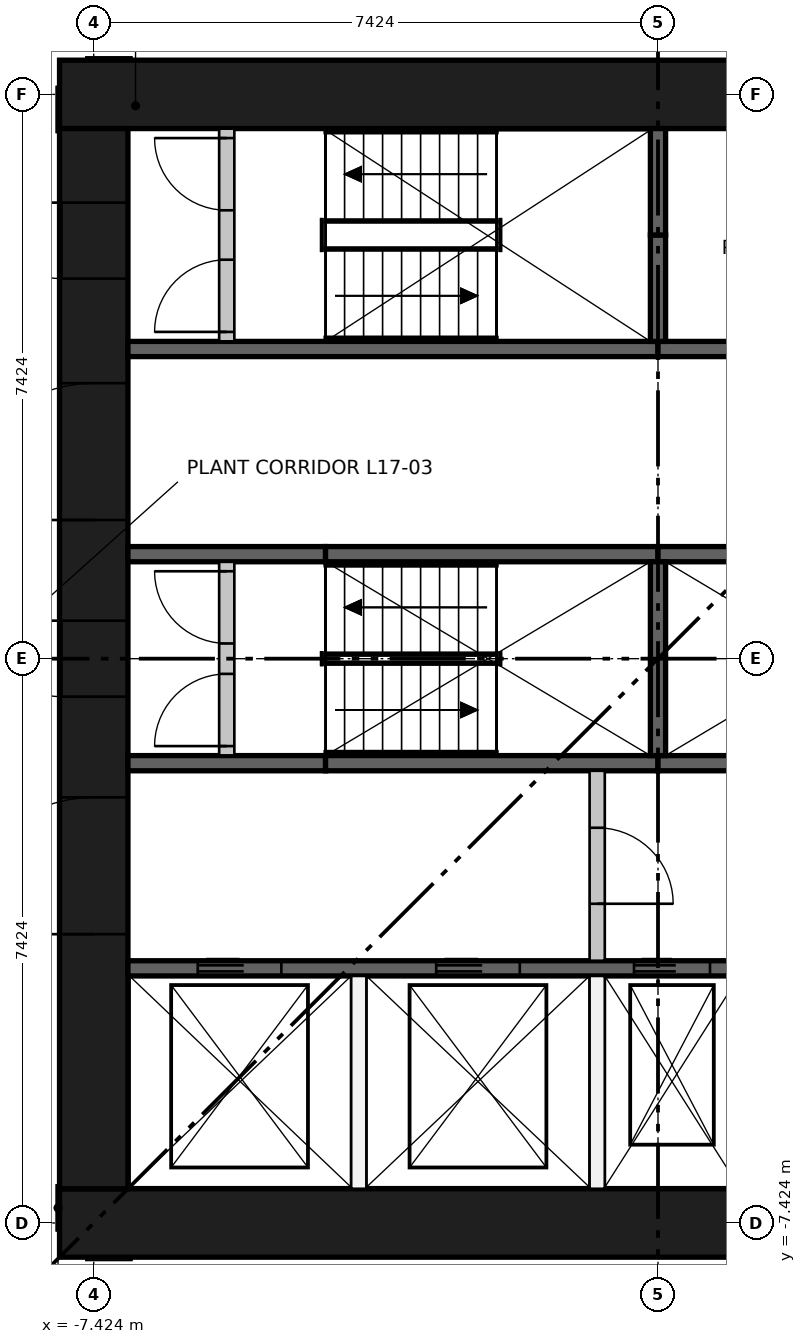
"""IFC4 building model, lengths in metres.
Left out: names, types, materials, properties, quantities, classifications, styles, units other than length and angle.
Written with IfcOpenShell. Run it as: python <this file> out.ifc"""

import sys

from ifc_helpers import new_model, si_unit, direction, frame, frame_2d, origin, place, context, subcontext, project, spatial, rectangle, extrude, element, fill, save


model = new_model("IFC4")
c1 = context("Model", 3, precision=1e-05, world=origin(), true_north=direction((0.0, 1.0)))
c2 = subcontext(c1, "Body", "Model", "MODEL_VIEW")
j1 = project(units=[si_unit("LENGTHUNIT", "METRE"), si_unit("PLANEANGLEUNIT", "RADIAN")], contexts=[c1])
p1 = place(None, origin())
s1 = spatial("IfcSite", under=j1, at=p1, CompositionType="ELEMENT")
p2 = place(p1, origin())
s2 = spatial("IfcBuilding", under=s1, at=p2, CompositionType="ELEMENT")
p3 = place(p2, frame((0.0, 0.0, 66.35)))
s3 = spatial("IfcBuildingStorey", under=s2, at=p3, CompositionType="ELEMENT", Elevation=66.35)
for number, where, z_axis, x_axis in (
    (1, (-7.874, -7.424, 0.0), (0.0, 0.0, 1.0), (1.0, 0.0, 0.0)),
    (2, (-7.874, 7.424, 0.0), (0.0, 0.0, 1.0), (1.0, 0.0, 0.0)),
):
    element("IfcWall", number, at=place(p3, frame(where, z_axis=z_axis, x_axis=x_axis)), inside=s3, PredefinedType="SHEAR", context=c2, shape_type="SweptSolid", body=[
        extrude(rectangle(XDim=15.748, YDim=0.9, at=frame_2d((7.874, 0.0))), origin(), (0.0, 0.0, 1.0), 6.4),
    ])
p4 = place(p3, frame((-7.424, -6.974, 0.0), z_axis=(0.0, 0.0, 1.0), x_axis=(0.0, 1.0, 0.0)))
e3 = element("IfcWall", 3, at=p4, inside=s3, PredefinedType="SHEAR", context=c2, shape_type="SweptSolid", body=[
    extrude(rectangle(XDim=13.948, YDim=0.9, at=frame_2d((6.974, 0.0))), origin(), (0.0, 0.0, 1.0), 6.4),
])
p5 = place(p4, frame((6.474, 0.0, 0.0)))
e4 = element("IfcOpeningElement", 4, at=p5, cuts=e3, PredefinedType="OPENING", context=c2, shape_type="SweptSolid", body=[
    extrude(rectangle(XDim=1.0, YDim=2.1, at=frame_2d((0.5, 1.05))), frame((0.0, 0.46, 0.0), z_axis=(0.0, -1.0, 0.0), x_axis=(1.0, 0.0, 0.0)), (0.0, 0.0, 1.0), 0.92),
])
p6 = place(p4, frame((3.35, 0.0, 0.0)))
e5 = element("IfcOpeningElement", 5, at=p6, cuts=e3, PredefinedType="OPENING", context=c2, shape_type="SweptSolid", body=[
    extrude(rectangle(XDim=1.8, YDim=2.1, at=frame_2d((0.9, 1.05))), frame((0.0, 0.46, 0.0), z_axis=(0.0, -1.0, 0.0), x_axis=(1.0, 0.0, 0.0)), (0.0, 0.0, 1.0), 0.92),
])
p7 = place(p4, frame((8.799, 0.0, 0.0)))
e6 = element("IfcOpeningElement", 6, at=p7, cuts=e3, PredefinedType="OPENING", context=c2, shape_type="SweptSolid", body=[
    extrude(rectangle(XDim=1.8, YDim=2.1, at=frame_2d((0.9, 1.05))), frame((0.0, 0.46, 0.0), z_axis=(0.0, -1.0, 0.0), x_axis=(1.0, 0.0, 0.0)), (0.0, 0.0, 1.0), 0.92),
])
p8 = place(p4, frame((11.974, 0.0, 0.0)))
e7 = element("IfcOpeningElement", 7, at=p8, cuts=e3, PredefinedType="OPENING", context=c2, shape_type="SweptSolid", body=[
    extrude(rectangle(XDim=1.0, YDim=2.1, at=frame_2d((0.5, 1.05))), frame((0.0, 0.46, 0.0), z_axis=(0.0, -1.0, 0.0), x_axis=(1.0, 0.0, 0.0)), (0.0, 0.0, 1.0), 0.92),
])
p9 = place(p3, frame((-6.974, -4.074, 0.0), z_axis=(0.0, 0.0, 1.0), x_axis=(1.0, 0.0, 0.0)))
e8 = element("IfcWall", 8, at=p9, inside=s3, PredefinedType="SHEAR", context=c2, shape_type="SweptSolid", body=[
    extrude(rectangle(XDim=13.948, YDim=0.2, at=frame_2d((6.974, 0.0))), origin(), (0.0, 0.0, 1.0), 6.05),
])
p10 = place(p9, frame((0.918, 0.0, 0.0)))
e9 = element("IfcOpeningElement", 9, at=p10, cuts=e8, PredefinedType="OPENING", context=c2, shape_type="SweptSolid", body=[
    extrude(rectangle(XDim=1.1, YDim=2.1, at=frame_2d((0.55, 1.05))), frame((0.0, 0.11, 0.0), z_axis=(0.0, -1.0, 0.0), x_axis=(1.0, 0.0, 0.0)), (0.0, 0.0, 1.0), 0.22),
])
p11 = place(p9, frame((4.055, 0.0, 0.0)))
e10 = element("IfcOpeningElement", 10, at=p11, cuts=e8, PredefinedType="OPENING", context=c2, shape_type="SweptSolid", body=[
    extrude(rectangle(XDim=1.1, YDim=2.1, at=frame_2d((0.55, 1.05))), frame((0.0, 0.11, 0.0), z_axis=(0.0, -1.0, 0.0), x_axis=(1.0, 0.0, 0.0)), (0.0, 0.0, 1.0), 0.22),
])
p12 = place(p9, frame((6.658, 0.0, 0.0)))
e11 = element("IfcOpeningElement", 11, at=p12, cuts=e8, PredefinedType="OPENING", context=c2, shape_type="SweptSolid", body=[
    extrude(rectangle(XDim=1.0, YDim=2.1, at=frame_2d((0.5, 1.05))), frame((0.0, 0.11, 0.0), z_axis=(0.0, -1.0, 0.0), x_axis=(1.0, 0.0, 0.0)), (0.0, 0.0, 1.0), 0.22),
])
p13 = place(p9, frame((8.627, 0.0, 0.0)))
e12 = element("IfcOpeningElement", 12, at=p13, cuts=e8, PredefinedType="OPENING", context=c2, shape_type="SweptSolid", body=[
    extrude(rectangle(XDim=1.0, YDim=2.1, at=frame_2d((0.5, 1.05))), frame((0.0, 0.11, 0.0), z_axis=(0.0, -1.0, 0.0), x_axis=(1.0, 0.0, 0.0)), (0.0, 0.0, 1.0), 0.22),
])
p14 = place(p9, frame((10.595, 0.0, 0.0)))
e13 = element("IfcOpeningElement", 13, at=p14, cuts=e8, PredefinedType="OPENING", context=c2, shape_type="SweptSolid", body=[
    extrude(rectangle(XDim=1.0, YDim=2.1, at=frame_2d((0.5, 1.05))), frame((0.0, 0.11, 0.0), z_axis=(0.0, -1.0, 0.0), x_axis=(1.0, 0.0, 0.0)), (0.0, 0.0, 1.0), 0.22),
])
p15 = place(p9, frame((12.564, 0.0, 0.0)))
e14 = element("IfcOpeningElement", 14, at=p15, cuts=e8, PredefinedType="OPENING", context=c2, shape_type="SweptSolid", body=[
    extrude(rectangle(XDim=1.0, YDim=2.1, at=frame_2d((0.5, 1.05))), frame((0.0, 0.11, 0.0), z_axis=(0.0, -1.0, 0.0), x_axis=(1.0, 0.0, 0.0)), (0.0, 0.0, 1.0), 0.22),
])
p16 = place(p3, frame((-6.974, 4.074, 0.0), z_axis=(0.0, 0.0, 1.0), x_axis=(1.0, 0.0, 0.0)))
e15 = element("IfcWall", 15, at=p16, inside=s3, PredefinedType="SHEAR", context=c2, shape_type="SweptSolid", body=[
    extrude(rectangle(XDim=6.974, YDim=0.2, at=frame_2d((3.487, 0.0))), origin(), (0.0, 0.0, 1.0), 6.05),
])
p17 = place(p3, frame((0.0, 4.074, 0.0), z_axis=(0.0, 0.0, 1.0), x_axis=(1.0, 0.0, 0.0)))
e16 = element("IfcWall", 16, at=p17, inside=s3, PredefinedType="SHEAR", context=c2, shape_type="SweptSolid", body=[
    extrude(rectangle(XDim=6.974, YDim=0.2, at=frame_2d((3.487, 0.0))), origin(), (0.0, 0.0, 1.0), 6.05),
])
p18 = place(p17, frame((1.187, 0.0, 0.0)))
e17 = element("IfcOpeningElement", 17, at=p18, cuts=e16, PredefinedType="OPENING", context=c2, shape_type="SweptSolid", body=[
    extrude(rectangle(XDim=1.0, YDim=2.1, at=frame_2d((0.5, 1.05))), frame((0.0, 0.11, 0.0), z_axis=(0.0, -1.0, 0.0), x_axis=(1.0, 0.0, 0.0)), (0.0, 0.0, 1.0), 0.22),
])
p19 = place(p17, frame((3.94, 0.0, 0.0)))
e18 = element("IfcOpeningElement", 18, at=p19, cuts=e16, PredefinedType="OPENING", context=c2, shape_type="SweptSolid", body=[
    extrude(rectangle(XDim=0.8, YDim=2.1, at=frame_2d((0.4, 1.05))), frame((0.0, 0.11, 0.0), z_axis=(0.0, -1.0, 0.0), x_axis=(1.0, 0.0, 0.0)), (0.0, 0.0, 1.0), 0.22),
])
p20 = place(p17, frame((5.79, 0.0, 0.0)))
e19 = element("IfcOpeningElement", 19, at=p20, cuts=e16, PredefinedType="OPENING", context=c2, shape_type="SweptSolid", body=[
    extrude(rectangle(XDim=0.8, YDim=2.1, at=frame_2d((0.4, 1.05))), frame((0.0, 0.11, 0.0), z_axis=(0.0, -1.0, 0.0), x_axis=(1.0, 0.0, 0.0)), (0.0, 0.0, 1.0), 0.22),
])
p21 = place(p3, frame((-6.974, -1.375, 0.0), z_axis=(0.0, 0.0, 1.0), x_axis=(1.0, 0.0, 0.0)))
e20 = element("IfcWall", 20, at=p21, inside=s3, PredefinedType="SHEAR", context=c2, shape_type="SweptSolid", body=[
    extrude(rectangle(XDim=2.6, YDim=0.2, at=frame_2d((1.3, 0.0))), origin(), (0.0, 0.0, 1.0), 6.05),
])
for number, where, z_axis, x_axis in (
    (21, (-4.374, -1.375, 0.0), (0.0, 0.0, 1.0), (1.0, 0.0, 0.0)),
    (22, (0.0, -1.375, 0.0), (0.0, 0.0, 1.0), (1.0, 0.0, 0.0)),
):
    element("IfcWall", number, at=place(p3, frame(where, z_axis=z_axis, x_axis=x_axis)), inside=s3, PredefinedType="SHEAR", context=c2, shape_type="SweptSolid", body=[
        extrude(rectangle(XDim=4.374, YDim=0.2, at=frame_2d((2.187, 0.0))), origin(), (0.0, 0.0, 1.0), 6.05),
    ])
p22 = place(p3, frame((-6.974, 1.375, 0.0), z_axis=(0.0, 0.0, 1.0), x_axis=(1.0, 0.0, 0.0)))
e23 = element("IfcWall", 23, at=p22, inside=s3, PredefinedType="SHEAR", context=c2, shape_type="SweptSolid", body=[
    extrude(rectangle(XDim=2.6, YDim=0.2, at=frame_2d((1.3, 0.0))), origin(), (0.0, 0.0, 1.0), 6.05),
])
for number, where, z_axis, x_axis in (
    (24, (-4.374, 1.375, 0.0), (0.0, 0.0, 1.0), (1.0, 0.0, 0.0)),
    (25, (0.0, 1.375, 0.0), (0.0, 0.0, 1.0), (1.0, 0.0, 0.0)),
):
    element("IfcWall", number, at=place(p3, frame(where, z_axis=z_axis, x_axis=x_axis)), inside=s3, PredefinedType="SHEAR", context=c2, shape_type="SweptSolid", body=[
        extrude(rectangle(XDim=4.374, YDim=0.2, at=frame_2d((2.187, 0.0))), origin(), (0.0, 0.0, 1.0), 6.05),
    ])
p23 = place(p3, frame((0.0, -1.275, 0.0), z_axis=(0.0, 0.0, 1.0), x_axis=(0.0, 1.0, 0.0)))
e26 = element("IfcWall", 26, at=p23, inside=s3, PredefinedType="SHEAR", context=c2, shape_type="SweptSolid", body=[
    extrude(rectangle(XDim=2.55, YDim=0.2, at=frame_2d((1.275, 0.0))), origin(), (0.0, 0.0, 1.0), 6.05),
])
for number, where, z_axis, x_axis in (
    (27, (-3.937, -6.974, 0.0), (0.0, 0.0, 1.0), (0.0, 1.0, 0.0)),
    (28, (-0.8, -6.974, 0.0), (0.0, 0.0, 1.0), (0.0, 1.0, 0.0)),
):
    element("IfcWall", number, at=place(p3, frame(where, z_axis=z_axis, x_axis=x_axis)), inside=s3, PredefinedType="PARTITIONING", context=c2, shape_type="SweptSolid", body=[
        extrude(rectangle(XDim=2.8, YDim=0.2, at=frame_2d((1.4, 0.0))), origin(), (0.0, 0.0, 1.0), 6.05),
    ])
p24 = place(p3, frame((-0.8, -3.974, 0.0), z_axis=(0.0, 0.0, 1.0), x_axis=(0.0, 1.0, 0.0)))
e29 = element("IfcWall", 29, at=p24, inside=s3, PredefinedType="PARTITIONING", context=c2, shape_type="SweptSolid", body=[
    extrude(rectangle(XDim=2.499, YDim=0.2, at=frame_2d((1.25, 0.0))), origin(), (0.0, 0.0, 1.0), 6.05),
])
p25 = place(p24, frame((0.75, 0.0, 0.0)))
e30 = element("IfcOpeningElement", 30, at=p25, cuts=e29, PredefinedType="OPENING", context=c2, shape_type="SweptSolid", body=[
    extrude(rectangle(XDim=1.0, YDim=2.1, at=frame_2d((0.5, 1.05))), frame((0.0, 0.11, 0.0), z_axis=(0.0, -1.0, 0.0), x_axis=(1.0, 0.0, 0.0)), (0.0, 0.0, 1.0), 0.22),
])
p26 = place(p3, frame((0.0, 4.174, 0.0), z_axis=(0.0, 0.0, 1.0), x_axis=(0.0, 1.0, 0.0)))
e31 = element("IfcWall", 31, at=p26, inside=s3, PredefinedType="SHEAR", context=c2, shape_type="SweptSolid", body=[
    extrude(rectangle(XDim=1.4, YDim=0.2, at=frame_2d((0.7, 0.0))), origin(), (0.0, 0.0, 1.0), 6.05),
])
p27 = place(p3, frame((0.0, 5.574, 0.0), z_axis=(0.0, 0.0, 1.0), x_axis=(0.0, 1.0, 0.0)))
e32 = element("IfcWall", 32, at=p27, inside=s3, PredefinedType="SHEAR", context=c2, shape_type="SweptSolid", body=[
    extrude(rectangle(XDim=1.4, YDim=0.2, at=frame_2d((0.7, 0.0))), origin(), (0.0, 0.0, 1.0), 6.05),
])
p28 = place(p3, frame((-5.674, -1.275, 0.0), z_axis=(0.0, 0.0, 1.0), x_axis=(0.0, 1.0, 0.0)))
e33 = element("IfcWall", 33, at=p28, inside=s3, PredefinedType="PARTITIONING", context=c2, shape_type="SweptSolid", body=[
    extrude(rectangle(XDim=2.55, YDim=0.2, at=frame_2d((1.275, 0.0))), origin(), (0.0, 0.0, 1.0), 6.05),
])
p29 = place(p28, frame((0.125, 0.0, 0.0)))
e34 = element("IfcOpeningElement", 34, at=p29, cuts=e33, PredefinedType="OPENING", context=c2, shape_type="SweptSolid", body=[
    extrude(rectangle(XDim=0.95, YDim=2.1, at=frame_2d((0.475, 1.05))), frame((0.0, 0.11, 0.0), z_axis=(0.0, -1.0, 0.0), x_axis=(1.0, 0.0, 0.0)), (0.0, 0.0, 1.0), 0.22),
])
p30 = place(p28, frame((1.475, 0.0, 0.0)))
e35 = element("IfcOpeningElement", 35, at=p30, cuts=e33, PredefinedType="OPENING", context=c2, shape_type="SweptSolid", body=[
    extrude(rectangle(XDim=0.95, YDim=2.1, at=frame_2d((0.475, 1.05))), frame((0.0, 0.11, 0.0), z_axis=(0.0, -1.0, 0.0), x_axis=(1.0, 0.0, 0.0)), (0.0, 0.0, 1.0), 0.22),
])
p31 = place(p3, frame((-5.674, 4.174, 0.0), z_axis=(0.0, 0.0, 1.0), x_axis=(0.0, 1.0, 0.0)))
e36 = element("IfcWall", 36, at=p31, inside=s3, PredefinedType="PARTITIONING", context=c2, shape_type="SweptSolid", body=[
    extrude(rectangle(XDim=2.8, YDim=0.2, at=frame_2d((1.4, 0.0))), origin(), (0.0, 0.0, 1.0), 6.05),
])
p32 = place(p31, frame((0.125, 0.0, 0.0)))
e37 = element("IfcOpeningElement", 37, at=p32, cuts=e36, PredefinedType="OPENING", context=c2, shape_type="SweptSolid", body=[
    extrude(rectangle(XDim=0.95, YDim=2.1, at=frame_2d((0.475, 1.05))), frame((0.0, 0.11, 0.0), z_axis=(0.0, -1.0, 0.0), x_axis=(1.0, 0.0, 0.0)), (0.0, 0.0, 1.0), 0.22),
])
p33 = place(p31, frame((1.725, 0.0, 0.0)))
e38 = element("IfcOpeningElement", 38, at=p33, cuts=e36, PredefinedType="OPENING", context=c2, shape_type="SweptSolid", body=[
    extrude(rectangle(XDim=0.95, YDim=2.1, at=frame_2d((0.475, 1.05))), frame((0.0, 0.11, 0.0), z_axis=(0.0, -1.0, 0.0), x_axis=(1.0, 0.0, 0.0)), (0.0, 0.0, 1.0), 0.22),
])
p34 = place(p10, origin())
e39 = element("IfcDoor", 39, at=p34, inside=s3, OperationType="DOUBLE_DOOR_SLIDING", PredefinedType="DOOR", context=c2, shape_type="SweptSolid", body=[
    extrude(rectangle(XDim=1.1, YDim=2.1, at=frame_2d((0.55, 1.05))), frame((0.0, 0.025, 0.0), z_axis=(0.0, -1.0, 0.0), x_axis=(1.0, 0.0, 0.0)), (0.0, 0.0, 1.0), 0.05),
])
fill(e9, e39)
p35 = place(p11, origin())
e40 = element("IfcDoor", 40, at=p35, inside=s3, OperationType="DOUBLE_DOOR_SLIDING", PredefinedType="DOOR", context=c2, shape_type="SweptSolid", body=[
    extrude(rectangle(XDim=1.1, YDim=2.1, at=frame_2d((0.55, 1.05))), frame((0.0, 0.025, 0.0), z_axis=(0.0, -1.0, 0.0), x_axis=(1.0, 0.0, 0.0)), (0.0, 0.0, 1.0), 0.05),
])
fill(e10, e40)
p36 = place(p12, origin())
e41 = element("IfcDoor", 41, at=p36, inside=s3, OperationType="DOUBLE_DOOR_SLIDING", PredefinedType="DOOR", context=c2, shape_type="SweptSolid", body=[
    extrude(rectangle(XDim=1.0, YDim=2.1, at=frame_2d((0.5, 1.05))), frame((0.0, 0.025, 0.0), z_axis=(0.0, -1.0, 0.0), x_axis=(1.0, 0.0, 0.0)), (0.0, 0.0, 1.0), 0.05),
])
fill(e11, e41)
p37 = place(p29, origin())
e42 = element("IfcDoor", 42, at=p37, inside=s3, OperationType="SINGLE_SWING_LEFT", PredefinedType="DOOR", context=c2, shape_type="SweptSolid", body=[
    extrude(rectangle(XDim=0.95, YDim=2.1, at=frame_2d((0.475, 1.05))), frame((0.0, 0.025, 0.0), z_axis=(0.0, -1.0, 0.0), x_axis=(1.0, 0.0, 0.0)), (0.0, 0.0, 1.0), 0.05),
])
fill(e34, e42)
p38 = place(p30, origin())
e43 = element("IfcDoor", 43, at=p38, inside=s3, OperationType="SINGLE_SWING_RIGHT", PredefinedType="DOOR", context=c2, shape_type="SweptSolid", body=[
    extrude(rectangle(XDim=0.95, YDim=2.1, at=frame_2d((0.475, 1.05))), frame((0.0, 0.025, 0.0), z_axis=(0.0, -1.0, 0.0), x_axis=(1.0, 0.0, 0.0)), (0.0, 0.0, 1.0), 0.05),
])
fill(e35, e43)
p39 = place(p32, origin())
e44 = element("IfcDoor", 44, at=p39, inside=s3, OperationType="SINGLE_SWING_LEFT", PredefinedType="DOOR", context=c2, shape_type="SweptSolid", body=[
    extrude(rectangle(XDim=0.95, YDim=2.1, at=frame_2d((0.475, 1.05))), frame((0.0, 0.025, 0.0), z_axis=(0.0, -1.0, 0.0), x_axis=(1.0, 0.0, 0.0)), (0.0, 0.0, 1.0), 0.05),
])
fill(e37, e44)
p40 = place(p33, origin())
e45 = element("IfcDoor", 45, at=p40, inside=s3, OperationType="SINGLE_SWING_RIGHT", PredefinedType="DOOR", context=c2, shape_type="SweptSolid", body=[
    extrude(rectangle(XDim=0.95, YDim=2.1, at=frame_2d((0.475, 1.05))), frame((0.0, 0.025, 0.0), z_axis=(0.0, -1.0, 0.0), x_axis=(1.0, 0.0, 0.0)), (0.0, 0.0, 1.0), 0.05),
])
fill(e38, e45)
p41 = place(p25, frame((1.0, 0.0, 0.0), z_axis=(0.0, 0.0, 1.0), x_axis=(-1.0, 0.0, 0.0)))
e46 = element("IfcDoor", 46, at=p41, inside=s3, OperationType="SINGLE_SWING_LEFT", PredefinedType="DOOR", context=c2, shape_type="SweptSolid", body=[
    extrude(rectangle(XDim=1.0, YDim=2.1, at=frame_2d((0.5, 1.05))), frame((0.0, 0.025, 0.0), z_axis=(0.0, -1.0, 0.0), x_axis=(1.0, 0.0, 0.0)), (0.0, 0.0, 1.0), 0.05),
])
fill(e30, e46)
p42 = place(p5, origin())
e47 = element("IfcDoor", 47, at=p42, inside=s3, OperationType="SINGLE_SWING_RIGHT", PredefinedType="DOOR", context=c2, shape_type="SweptSolid", body=[
    extrude(rectangle(XDim=1.0, YDim=2.1, at=frame_2d((0.5, 1.05))), frame((0.0, 0.45, 0.0), z_axis=(0.0, -1.0, 0.0), x_axis=(1.0, 0.0, 0.0)), (0.0, 0.0, 1.0), 0.05),
])
fill(e4, e47)
p43 = place(p6, origin())
e48 = element("IfcDoor", 48, at=p43, inside=s3, OperationType="DOUBLE_DOOR_SINGLE_SWING", PredefinedType="DOOR", context=c2, shape_type="SweptSolid", body=[
    extrude(rectangle(XDim=1.8, YDim=2.1, at=frame_2d((0.9, 1.05))), frame((0.0, 0.025, 0.0), z_axis=(0.0, -1.0, 0.0), x_axis=(1.0, 0.0, 0.0)), (0.0, 0.0, 1.0), 0.05),
])
fill(e5, e48)
p44 = place(p7, origin())
e49 = element("IfcDoor", 49, at=p44, inside=s3, OperationType="DOUBLE_DOOR_SINGLE_SWING", PredefinedType="DOOR", context=c2, shape_type="SweptSolid", body=[
    extrude(rectangle(XDim=1.8, YDim=2.1, at=frame_2d((0.9, 1.05))), frame((0.0, 0.025, 0.0), z_axis=(0.0, -1.0, 0.0), x_axis=(1.0, 0.0, 0.0)), (0.0, 0.0, 1.0), 0.05),
])
fill(e6, e49)
p45 = place(p8, origin())
e50 = element("IfcDoor", 50, at=p45, inside=s3, OperationType="SINGLE_SWING_RIGHT", PredefinedType="DOOR", context=c2, shape_type="SweptSolid", body=[
    extrude(rectangle(XDim=1.0, YDim=2.1, at=frame_2d((0.5, 1.05))), frame((0.0, 0.45, 0.0), z_axis=(0.0, -1.0, 0.0), x_axis=(1.0, 0.0, 0.0)), (0.0, 0.0, 1.0), 0.05),
])
fill(e7, e50)
save(model, sys.argv[1])
